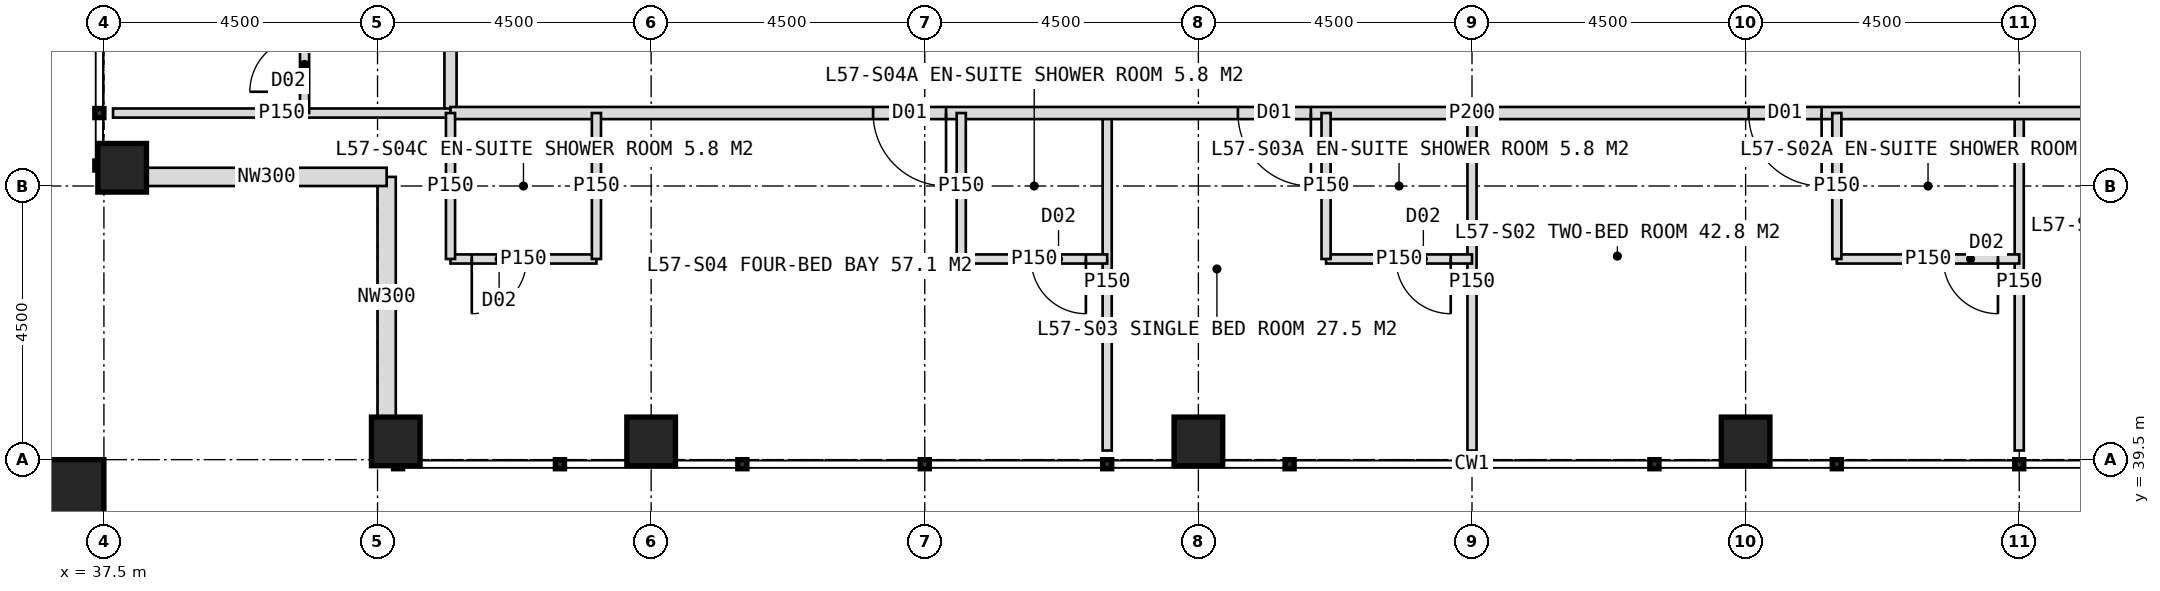
"""IFC4 building model, lengths in metres.
Left out: names, types, materials, properties, quantities, classifications, styles, units other than length and angle.
Written with IfcOpenShell. Run it as: python <this file> out.ifc"""

import sys

from ifc_helpers import new_model, si_unit, direction, frame, frame_2d, origin, origin_2d, place, context, subcontext, project, spatial, rectangle, hollow_rectangle, extrude, element, fill, save


model = new_model("IFC4")
c1 = context("Model", 3, precision=1e-05, world=origin(), true_north=direction((0.0, 1.0)))
c2 = subcontext(c1, "Body", "Model", "MODEL_VIEW")
j1 = project(units=[si_unit("LENGTHUNIT", "METRE"), si_unit("PLANEANGLEUNIT", "RADIAN")], contexts=[c1])
p1 = place(None, origin())
s1 = spatial("IfcSite", under=j1, at=p1, CompositionType="ELEMENT")
p2 = place(p1, origin())
s2 = spatial("IfcBuilding", under=s1, at=p2, CompositionType="ELEMENT")
p3 = place(p2, frame((0.0, 0.0, 237.0)))
s3 = spatial("IfcBuildingStorey", under=s2, at=p3, CompositionType="ELEMENT", Elevation=237.0)
for number, where, z_axis, x_axis in (
    (1, (42.3, 39.8, 0.0), (0.0, 0.0, 1.0), (1.0, 0.0, 0.0)),
    (2, (37.8, 44.3, 0.0), (0.0, 0.0, 1.0), (1.0, 0.0, 0.0)),
    (3, (46.5, 39.8, 0.0), (0.0, 0.0, 1.0), (1.0, 0.0, 0.0)),
    (4, (55.5, 39.8, 0.0), (0.0, 0.0, 1.0), (1.0, 0.0, 0.0)),
    (5, (64.5, 39.8, 0.0), (0.0, 0.0, 1.0), (1.0, 0.0, 0.0)),
):
    element("IfcColumn", number, at=place(p3, frame(where, z_axis=z_axis, x_axis=x_axis)), inside=s3, PredefinedType="COLUMN", context=c2, shape_type="SweptSolid", body=[
        extrude(hollow_rectangle(XDim=0.8, YDim=0.8, WallThickness=0.08, at=origin_2d()), origin(), (0.0, 0.0, 1.0), 4.0),
    ])
p4 = place(p3, frame((36.9, 38.9, 0.0), z_axis=(0.0, 0.0, 1.0), x_axis=(1.0, 0.0, 0.0)))
e6 = element("IfcColumn", 6, at=p4, inside=s3, PredefinedType="COLUMN", context=c2, shape_type="SweptSolid", body=[
    extrude(hollow_rectangle(XDim=1.2, YDim=1.2, WallThickness=0.07, at=origin_2d()), origin(), (0.0, 0.0, 1.0), 4.0),
])
for number, where, z_axis, x_axis in (
    (7, (42.15, 40.2, 0.0), (0.0, 0.0, 1.0), (0.0, 1.0, 0.0)),
    (8, (42.15, 44.15, 0.0), (0.0, 0.0, 1.0), (-1.0, 0.0, 0.0)),
):
    element("IfcWall", number, at=place(p3, frame(where, z_axis=z_axis, x_axis=x_axis)), inside=s3, PredefinedType="ELEMENTEDWALL", context=c2, shape_type="SweptSolid", body=[
        extrude(rectangle(XDim=3.95, YDim=0.3, at=frame_2d((1.975, 0.0))), origin(), (0.0, 0.0, 1.0), 2.85),
    ])
p5 = place(p3, frame((43.2, 45.2, 0.0), z_axis=(0.0, 0.0, 1.0), x_axis=(0.0, 1.0, 0.0)))
e9 = element("IfcWall", 9, at=p5, inside=s3, PredefinedType="PARTITIONING", context=c2, shape_type="SweptSolid", body=[
    extrude(rectangle(XDim=33.6, YDim=0.2, at=frame_2d((16.8, 0.0))), origin(), (0.0, 0.0, 1.0), 3.75),
])
p6 = place(p5, frame((2.65, 0.0, 0.0)))
e10 = element("IfcOpeningElement", 10, at=p6, cuts=e9, PredefinedType="OPENING", context=c2, shape_type="SweptSolid", body=[
    extrude(rectangle(XDim=1.2, YDim=2.2, at=frame_2d((0.6, 1.1))), frame((0.0, 0.11, 0.0), z_axis=(0.0, -1.0, 0.0), x_axis=(1.0, 0.0, 0.0)), (0.0, 0.0, 1.0), 0.22),
])
p7 = place(p5, frame((7.45, 0.0, 0.0)))
e11 = element("IfcOpeningElement", 11, at=p7, cuts=e9, PredefinedType="OPENING", context=c2, shape_type="SweptSolid", body=[
    extrude(rectangle(XDim=1.2, YDim=2.2, at=frame_2d((0.6, 1.1))), frame((0.0, 0.11, 0.0), z_axis=(0.0, -1.0, 0.0), x_axis=(1.0, 0.0, 0.0)), (0.0, 0.0, 1.0), 0.22),
])
p8 = place(p5, frame((13.45, 0.0, 0.0)))
e12 = element("IfcOpeningElement", 12, at=p8, cuts=e9, PredefinedType="OPENING", context=c2, shape_type="SweptSolid", body=[
    extrude(rectangle(XDim=1.2, YDim=2.2, at=frame_2d((0.6, 1.1))), frame((0.0, 0.11, 0.0), z_axis=(0.0, -1.0, 0.0), x_axis=(1.0, 0.0, 0.0)), (0.0, 0.0, 1.0), 0.22),
])
p9 = place(p5, frame((20.05, 0.0, 0.0)))
e13 = element("IfcOpeningElement", 13, at=p9, cuts=e9, PredefinedType="OPENING", context=c2, shape_type="SweptSolid", body=[
    extrude(rectangle(XDim=1.2, YDim=2.2, at=frame_2d((0.6, 1.1))), frame((0.0, 0.11, 0.0), z_axis=(0.0, -1.0, 0.0), x_axis=(1.0, 0.0, 0.0)), (0.0, 0.0, 1.0), 0.22),
])
p10 = place(p5, frame((29.05, 0.0, 0.0)))
e14 = element("IfcOpeningElement", 14, at=p10, cuts=e9, PredefinedType="OPENING", context=c2, shape_type="SweptSolid", body=[
    extrude(rectangle(XDim=1.2, YDim=2.2, at=frame_2d((0.6, 1.1))), frame((0.0, 0.11, 0.0), z_axis=(0.0, -1.0, 0.0), x_axis=(1.0, 0.0, 0.0)), (0.0, 0.0, 1.0), 0.22),
])
p11 = place(p3, frame((43.2, 45.2, 0.0), z_axis=(0.0, 0.0, 1.0), x_axis=(-1.0, 0.0, 0.0)))
e15 = element("IfcWall", 15, at=p11, inside=s3, PredefinedType="PARTITIONING", context=c2, shape_type="SweptSolid", body=[
    extrude(rectangle(XDim=5.55, YDim=0.15, at=frame_2d((2.775, 0.0))), origin(), (0.0, 0.0, 1.0), 3.75),
])
p12 = place(p3, frame((40.8, 45.2, 0.0), z_axis=(0.0, 0.0, 1.0), x_axis=(0.0, 1.0, 0.0)))
e16 = element("IfcWall", 16, at=p12, inside=s3, PredefinedType="PARTITIONING", context=c2, shape_type="SweptSolid", body=[
    extrude(rectangle(XDim=2.4, YDim=0.15, at=frame_2d((1.2, 0.0))), origin(), (0.0, 0.0, 1.0), 3.75),
])
p13 = place(p12, frame((0.35, 0.0, 0.0)))
e17 = element("IfcOpeningElement", 17, at=p13, cuts=e16, PredefinedType="OPENING", context=c2, shape_type="SweptSolid", body=[
    extrude(rectangle(XDim=0.9, YDim=2.1, at=frame_2d((0.45, 1.05))), frame((0.0, 0.085, 0.0), z_axis=(0.0, -1.0, 0.0), x_axis=(1.0, 0.0, 0.0)), (0.0, 0.0, 1.0), 0.17),
])
p14 = place(p3, frame((69.0, 45.2, 0.0), z_axis=(0.0, 0.0, 1.0), x_axis=(0.0, -1.0, 0.0)))
e18 = element("IfcWall", 18, at=p14, inside=s3, PredefinedType="PARTITIONING", context=c2, shape_type="SweptSolid", body=[
    extrude(rectangle(XDim=5.55, YDim=0.15, at=frame_2d((2.775, 0.0))), origin(), (0.0, 0.0, 1.0), 3.75),
])
p15 = place(p3, frame((60.0, 45.2, 0.0), z_axis=(0.0, 0.0, 1.0), x_axis=(0.0, -1.0, 0.0)))
e19 = element("IfcWall", 19, at=p15, inside=s3, PredefinedType="PARTITIONING", context=c2, shape_type="SweptSolid", body=[
    extrude(rectangle(XDim=5.55, YDim=0.15, at=frame_2d((2.775, 0.0))), origin(), (0.0, 0.0, 1.0), 2.95),
])
p16 = place(p3, frame((54.0, 45.2, 0.0), z_axis=(0.0, 0.0, 1.0), x_axis=(0.0, -1.0, 0.0)))
e20 = element("IfcWall", 20, at=p16, inside=s3, PredefinedType="PARTITIONING", context=c2, shape_type="SweptSolid", body=[
    extrude(rectangle(XDim=5.55, YDim=0.15, at=frame_2d((2.775, 0.0))), origin(), (0.0, 0.0, 1.0), 3.75),
])
p17 = place(p3, frame((76.8, 45.2, 0.0), z_axis=(0.0, 0.0, 1.0), x_axis=(-1.0, 0.0, 0.0)))
e21 = element("IfcWall", 21, at=p17, inside=s3, PredefinedType="PARTITIONING", context=c2, shape_type="SweptSolid", body=[
    extrude(rectangle(XDim=33.6, YDim=0.2, at=frame_2d((16.8, 0.0))), origin(), (0.0, 0.0, 1.0), 3.75),
])
p18 = place(p17, frame((3.25, 0.0, 0.0)))
e22 = element("IfcOpeningElement", 22, at=p18, cuts=e21, PredefinedType="OPENING", context=c2, shape_type="SweptSolid", body=[
    extrude(rectangle(XDim=1.2, YDim=2.2, at=frame_2d((0.6, 1.1))), frame((0.0, 0.11, 0.0), z_axis=(0.0, -1.0, 0.0), x_axis=(1.0, 0.0, 0.0)), (0.0, 0.0, 1.0), 0.22),
])
p19 = place(p17, frame((11.05, 0.0, 0.0)))
e23 = element("IfcOpeningElement", 23, at=p19, cuts=e21, PredefinedType="OPENING", context=c2, shape_type="SweptSolid", body=[
    extrude(rectangle(XDim=1.2, YDim=2.2, at=frame_2d((0.6, 1.1))), frame((0.0, 0.11, 0.0), z_axis=(0.0, -1.0, 0.0), x_axis=(1.0, 0.0, 0.0)), (0.0, 0.0, 1.0), 0.22),
])
p20 = place(p17, frame((19.45, 0.0, 0.0)))
e24 = element("IfcOpeningElement", 24, at=p20, cuts=e21, PredefinedType="OPENING", context=c2, shape_type="SweptSolid", body=[
    extrude(rectangle(XDim=1.2, YDim=2.2, at=frame_2d((0.6, 1.1))), frame((0.0, 0.11, 0.0), z_axis=(0.0, -1.0, 0.0), x_axis=(1.0, 0.0, 0.0)), (0.0, 0.0, 1.0), 0.22),
])
p21 = place(p17, frame((25.45, 0.0, 0.0)))
e25 = element("IfcOpeningElement", 25, at=p21, cuts=e21, PredefinedType="OPENING", context=c2, shape_type="SweptSolid", body=[
    extrude(rectangle(XDim=1.2, YDim=2.2, at=frame_2d((0.6, 1.1))), frame((0.0, 0.11, 0.0), z_axis=(0.0, -1.0, 0.0), x_axis=(1.0, 0.0, 0.0)), (0.0, 0.0, 1.0), 0.22),
])
p22 = place(p3, frame((69.0, 42.8, 0.0), z_axis=(0.0, 0.0, 1.0), x_axis=(-1.0, 0.0, 0.0)))
e26 = element("IfcWall", 26, at=p22, inside=s3, PredefinedType="PARTITIONING", context=c2, shape_type="SweptSolid", body=[
    extrude(rectangle(XDim=3.0, YDim=0.15, at=frame_2d((1.5, 0.0))), origin(), (0.0, 0.0, 1.0), 3.75),
])
p23 = place(p22, frame((0.35, 0.0, 0.0)))
e27 = element("IfcOpeningElement", 27, at=p23, cuts=e26, PredefinedType="OPENING", context=c2, shape_type="SweptSolid", body=[
    extrude(rectangle(XDim=0.9, YDim=2.1, at=frame_2d((0.45, 1.05))), frame((0.0, 0.085, 0.0), z_axis=(0.0, -1.0, 0.0), x_axis=(1.0, 0.0, 0.0)), (0.0, 0.0, 1.0), 0.17),
])
p24 = place(p3, frame((66.0, 45.2, 0.0), z_axis=(0.0, 0.0, 1.0), x_axis=(0.0, -1.0, 0.0)))
e28 = element("IfcWall", 28, at=p24, inside=s3, PredefinedType="PARTITIONING", context=c2, shape_type="SweptSolid", body=[
    extrude(rectangle(XDim=2.4, YDim=0.15, at=frame_2d((1.2, 0.0))), origin(), (0.0, 0.0, 1.0), 3.75),
])
p25 = place(p3, frame((60.0, 42.8, 0.0), z_axis=(0.0, 0.0, 1.0), x_axis=(-1.0, 0.0, 0.0)))
e29 = element("IfcWall", 29, at=p25, inside=s3, PredefinedType="PARTITIONING", context=c2, shape_type="SweptSolid", body=[
    extrude(rectangle(XDim=2.4, YDim=0.15, at=frame_2d((1.2, 0.0))), origin(), (0.0, 0.0, 1.0), 3.75),
])
p26 = place(p25, frame((0.35, 0.0, 0.0)))
e30 = element("IfcOpeningElement", 30, at=p26, cuts=e29, PredefinedType="OPENING", context=c2, shape_type="SweptSolid", body=[
    extrude(rectangle(XDim=0.9, YDim=2.1, at=frame_2d((0.45, 1.05))), frame((0.0, 0.085, 0.0), z_axis=(0.0, -1.0, 0.0), x_axis=(1.0, 0.0, 0.0)), (0.0, 0.0, 1.0), 0.17),
])
p27 = place(p3, frame((57.6, 45.2, 0.0), z_axis=(0.0, 0.0, 1.0), x_axis=(0.0, -1.0, 0.0)))
e31 = element("IfcWall", 31, at=p27, inside=s3, PredefinedType="PARTITIONING", context=c2, shape_type="SweptSolid", body=[
    extrude(rectangle(XDim=2.4, YDim=0.15, at=frame_2d((1.2, 0.0))), origin(), (0.0, 0.0, 1.0), 3.75),
])
p28 = place(p3, frame((54.0, 42.8, 0.0), z_axis=(0.0, 0.0, 1.0), x_axis=(-1.0, 0.0, 0.0)))
e32 = element("IfcWall", 32, at=p28, inside=s3, PredefinedType="PARTITIONING", context=c2, shape_type="SweptSolid", body=[
    extrude(rectangle(XDim=2.4, YDim=0.15, at=frame_2d((1.2, 0.0))), origin(), (0.0, 0.0, 1.0), 3.75),
])
p29 = place(p28, frame((0.35, 0.0, 0.0)))
e33 = element("IfcOpeningElement", 33, at=p29, cuts=e32, PredefinedType="OPENING", context=c2, shape_type="SweptSolid", body=[
    extrude(rectangle(XDim=0.9, YDim=2.1, at=frame_2d((0.45, 1.05))), frame((0.0, 0.085, 0.0), z_axis=(0.0, -1.0, 0.0), x_axis=(1.0, 0.0, 0.0)), (0.0, 0.0, 1.0), 0.17),
])
p30 = place(p3, frame((51.6, 45.2, 0.0), z_axis=(0.0, 0.0, 1.0), x_axis=(0.0, -1.0, 0.0)))
e34 = element("IfcWall", 34, at=p30, inside=s3, PredefinedType="PARTITIONING", context=c2, shape_type="SweptSolid", body=[
    extrude(rectangle(XDim=2.4, YDim=0.15, at=frame_2d((1.2, 0.0))), origin(), (0.0, 0.0, 1.0), 3.75),
])
p31 = place(p3, frame((45.6, 42.8, 0.0), z_axis=(0.0, 0.0, 1.0), x_axis=(-1.0, 0.0, 0.0)))
e35 = element("IfcWall", 35, at=p31, inside=s3, PredefinedType="PARTITIONING", context=c2, shape_type="SweptSolid", body=[
    extrude(rectangle(XDim=2.4, YDim=0.15, at=frame_2d((1.2, 0.0))), origin(), (0.0, 0.0, 1.0), 3.75),
])
p32 = place(p31, frame((1.15, 0.0, 0.0)))
e36 = element("IfcOpeningElement", 36, at=p32, cuts=e35, PredefinedType="OPENING", context=c2, shape_type="SweptSolid", body=[
    extrude(rectangle(XDim=0.9, YDim=2.1, at=frame_2d((0.45, 1.05))), frame((0.0, 0.085, 0.0), z_axis=(0.0, -1.0, 0.0), x_axis=(1.0, 0.0, 0.0)), (0.0, 0.0, 1.0), 0.17),
])
for number, where, z_axis, x_axis in (
    (37, (45.6, 45.2, 0.0), (0.0, 0.0, 1.0), (0.0, -1.0, 0.0)),
    (38, (43.2, 45.2, 0.0), (0.0, 0.0, 1.0), (0.0, -1.0, 0.0)),
):
    element("IfcWall", number, at=place(p3, frame(where, z_axis=z_axis, x_axis=x_axis)), inside=s3, PredefinedType="PARTITIONING", context=c2, shape_type="SweptSolid", body=[
        extrude(rectangle(XDim=2.4, YDim=0.15, at=frame_2d((1.2, 0.0))), origin(), (0.0, 0.0, 1.0), 3.75),
    ])
p33 = place(p13, origin())
e39 = element("IfcDoor", 39, at=p33, inside=s3, OperationType="SINGLE_SWING_LEFT", PredefinedType="DOOR", context=c2, shape_type="SweptSolid", body=[
    extrude(rectangle(XDim=0.9, YDim=2.1, at=frame_2d((0.45, 1.05))), frame((0.0, 0.025, 0.0), z_axis=(0.0, -1.0, 0.0), x_axis=(1.0, 0.0, 0.0)), (0.0, 0.0, 1.0), 0.05),
])
fill(e17, e39)
p34 = place(p19, origin())
e40 = element("IfcDoor", 40, at=p34, inside=s3, OperationType="SINGLE_SWING_LEFT", PredefinedType="DOOR", context=c2, shape_type="SweptSolid", body=[
    extrude(rectangle(XDim=1.2, YDim=2.2, at=frame_2d((0.6, 1.1))), frame((0.0, 0.025, 0.0), z_axis=(0.0, -1.0, 0.0), x_axis=(1.0, 0.0, 0.0)), (0.0, 0.0, 1.0), 0.05),
])
fill(e23, e40)
p35 = place(p23, origin())
e41 = element("IfcDoor", 41, at=p35, inside=s3, OperationType="SINGLE_SWING_LEFT", PredefinedType="DOOR", context=c2, shape_type="SweptSolid", body=[
    extrude(rectangle(XDim=0.9, YDim=2.1, at=frame_2d((0.45, 1.05))), frame((0.0, 0.025, 0.0), z_axis=(0.0, -1.0, 0.0), x_axis=(1.0, 0.0, 0.0)), (0.0, 0.0, 1.0), 0.05),
])
fill(e27, e41)
p36 = place(p20, origin())
e42 = element("IfcDoor", 42, at=p36, inside=s3, OperationType="SINGLE_SWING_LEFT", PredefinedType="DOOR", context=c2, shape_type="SweptSolid", body=[
    extrude(rectangle(XDim=1.2, YDim=2.2, at=frame_2d((0.6, 1.1))), frame((0.0, 0.025, 0.0), z_axis=(0.0, -1.0, 0.0), x_axis=(1.0, 0.0, 0.0)), (0.0, 0.0, 1.0), 0.05),
])
fill(e24, e42)
p37 = place(p26, origin())
e43 = element("IfcDoor", 43, at=p37, inside=s3, OperationType="SINGLE_SWING_LEFT", PredefinedType="DOOR", context=c2, shape_type="SweptSolid", body=[
    extrude(rectangle(XDim=0.9, YDim=2.1, at=frame_2d((0.45, 1.05))), frame((0.0, 0.025, 0.0), z_axis=(0.0, -1.0, 0.0), x_axis=(1.0, 0.0, 0.0)), (0.0, 0.0, 1.0), 0.05),
])
fill(e30, e43)
p38 = place(p21, origin())
e44 = element("IfcDoor", 44, at=p38, inside=s3, OperationType="SINGLE_SWING_LEFT", PredefinedType="DOOR", context=c2, shape_type="SweptSolid", body=[
    extrude(rectangle(XDim=1.2, YDim=2.2, at=frame_2d((0.6, 1.1))), frame((0.0, 0.025, 0.0), z_axis=(0.0, -1.0, 0.0), x_axis=(1.0, 0.0, 0.0)), (0.0, 0.0, 1.0), 0.05),
])
fill(e25, e44)
p39 = place(p29, origin())
e45 = element("IfcDoor", 45, at=p39, inside=s3, OperationType="SINGLE_SWING_LEFT", PredefinedType="DOOR", context=c2, shape_type="SweptSolid", body=[
    extrude(rectangle(XDim=0.9, YDim=2.1, at=frame_2d((0.45, 1.05))), frame((0.0, 0.025, 0.0), z_axis=(0.0, -1.0, 0.0), x_axis=(1.0, 0.0, 0.0)), (0.0, 0.0, 1.0), 0.05),
])
fill(e33, e45)
p40 = place(p32, origin())
e46 = element("IfcDoor", 46, at=p40, inside=s3, OperationType="SINGLE_SWING_RIGHT", PredefinedType="DOOR", context=c2, shape_type="SweptSolid", body=[
    extrude(rectangle(XDim=0.9, YDim=2.1, at=frame_2d((0.45, 1.05))), frame((0.0, 0.025, 0.0), z_axis=(0.0, -1.0, 0.0), x_axis=(1.0, 0.0, 0.0)), (0.0, 0.0, 1.0), 0.05),
])
fill(e36, e46)
save(model, sys.argv[1])
